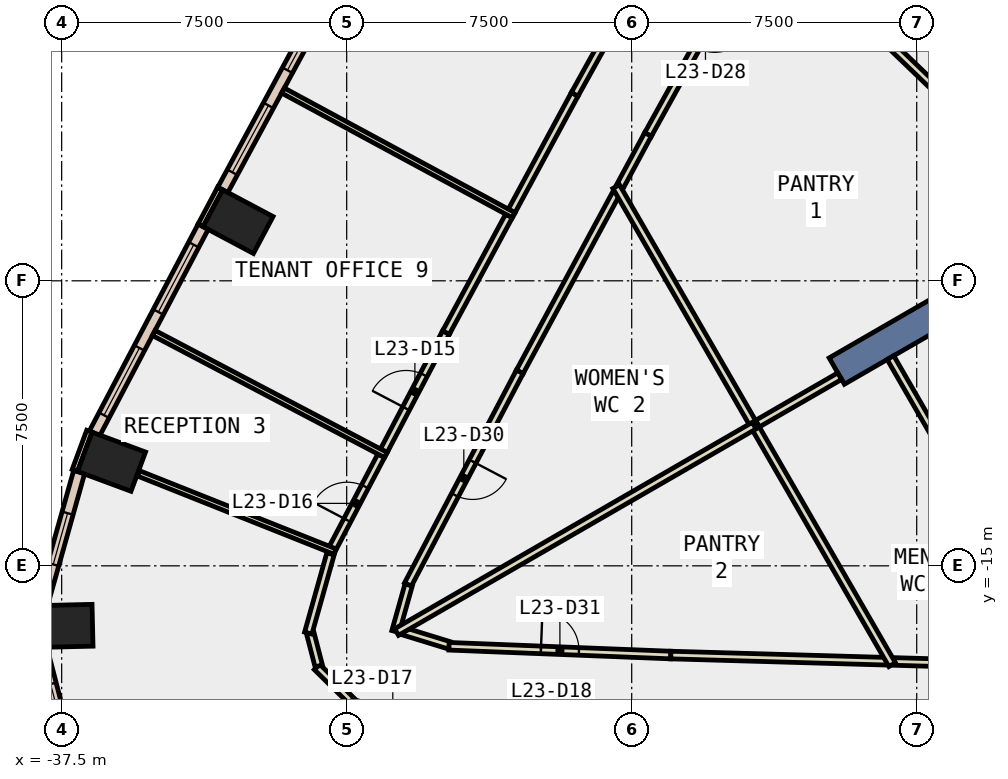
"""IFC4 building model, lengths in metres.
Left out: names, types, materials, properties, quantities, classifications, styles, units other than length and angle.
Written with IfcOpenShell. Run it as: python <this file> out.ifc"""

import sys

from ifc_helpers import new_model, si_unit, direction, frame, frame_2d, origin, origin_2d, place, context, subcontext, project, spatial, rectangle, extrude, element, fill, save


model = new_model("IFC4")
c1 = context("Model", 3, precision=1e-05, world=origin(), true_north=direction((0.0, 1.0)))
c2 = subcontext(c1, "Body", "Model", "MODEL_VIEW")
j1 = project(units=[si_unit("LENGTHUNIT", "METRE"), si_unit("PLANEANGLEUNIT", "RADIAN")], contexts=[c1])
p1 = place(None, origin())
s1 = spatial("IfcSite", under=j1, at=p1, CompositionType="ELEMENT")
p2 = place(p1, origin())
s2 = spatial("IfcBuilding", under=s1, at=p2, CompositionType="ELEMENT")
p3 = place(p2, frame((0.0, 0.0, 107.6)))
s3 = spatial("IfcBuildingStorey", under=s2, at=p3, CompositionType="ELEMENT", Elevation=107.6)
for number, where, z_axis, x_axis in (
    (1, (-32.858, -5.943, -0.4), (0.0, 0.0, 1.0), (0.469, 0.883, 0.0)),
    (2, (-36.188, -12.261, -0.4), (0.0, 0.0, 1.0), (0.347, 0.938, 0.0)),
    (3, (-37.438, -16.581, -0.4), (0.0, 0.0, 1.0), (-0.023, 1.0, 0.0)),
):
    element("IfcColumn", number, at=place(p3, frame(where, z_axis=z_axis, x_axis=x_axis)), inside=s3, PredefinedType="COLUMN", context=c2, shape_type="SweptSolid", body=[
        extrude(rectangle(XDim=1.1, YDim=1.5, at=origin_2d()), origin(), (0.0, 0.0, 1.0), 4.2),
    ])
p4 = place(p3, frame((-9.31, -5.375, -0.4), z_axis=(0.0, 0.0, 1.0), x_axis=(-0.866017533419, -0.500013631625, 0.0)))
e4 = element("IfcWall", 4, at=p4, inside=s3, PredefinedType="SHEAR", context=c2, shape_type="SweptSolid", body=[
    extrude(rectangle(XDim=9.0, YDim=0.8, at=frame_2d((4.5, 0.0))), origin(), (0.0, 0.0, 1.0), 4.2),
])
p5 = place(p3, frame((-33.329, -5.071, 0.0), z_axis=(0.0, 0.0, 1.0), x_axis=(-0.46919310775, -0.883095593716, 0.0)))
e5 = element("IfcWall", 5, at=p5, inside=s3, PredefinedType="STANDARD", context=c2, shape_type="SweptSolid", body=[
    extrude(rectangle(XDim=1.099, YDim=0.15, at=frame_2d((0.55, 0.0))), origin(), (0.0, 0.0, 1.0), 3.8),
])
p6 = place(p3, frame((-36.771, -11.458, 0.0), z_axis=(0.0, 0.0, 1.0), x_axis=(-0.347205967468, -0.937788897436, 0.0)))
e6 = element("IfcWall", 6, at=p6, inside=s3, PredefinedType="STANDARD", context=c2, shape_type="SweptSolid", body=[
    extrude(rectangle(XDim=1.1, YDim=0.15, at=frame_2d((0.55, 0.0))), origin(), (0.0, 0.0, 1.0), 3.8),
])
p7 = place(p3, frame((-30.357, 0.262, 0.0), z_axis=(0.0, 0.0, 1.0), x_axis=(-0.475573079782, -0.879676216449, 0.0)))
e7 = element("IfcWall", 7, at=p7, inside=s3, PredefinedType="STANDARD", context=c2, shape_type="SweptSolid", body=[
    extrude(rectangle(XDim=6.104, YDim=0.3, at=frame_2d((3.052, 0.0))), origin(), (0.0, 0.0, 1.0), 3.8),
])
p8 = place(p7, frame((0.526, 0.0, 0.9)))
e8 = element("IfcOpeningElement", 8, at=p8, cuts=e7, PredefinedType="OPENING", context=c2, shape_type="SweptSolid", body=[
    extrude(rectangle(XDim=2.0, YDim=2.6, at=frame_2d((1.0, 1.3))), frame((0.0, 0.16, 0.0), z_axis=(0.0, -1.0, 0.0), x_axis=(1.0, 0.0, 0.0)), (0.0, 0.0, 1.0), 0.32),
])
p9 = place(p7, frame((3.578, 0.0, 0.9)))
e9 = element("IfcOpeningElement", 9, at=p9, cuts=e7, PredefinedType="OPENING", context=c2, shape_type="SweptSolid", body=[
    extrude(rectangle(XDim=2.0, YDim=2.6, at=frame_2d((1.0, 1.3))), frame((0.0, 0.16, 0.0), z_axis=(0.0, -1.0, 0.0), x_axis=(1.0, 0.0, 0.0)), (0.0, 0.0, 1.0), 0.32),
])
p10 = place(p3, frame((-33.776, -6.077, 0.0), z_axis=(0.0, 0.0, 1.0), x_axis=(-0.465380908665, -0.88511050714, 0.0)))
e10 = element("IfcWall", 10, at=p10, inside=s3, PredefinedType="STANDARD", context=c2, shape_type="SweptSolid", body=[
    extrude(rectangle(XDim=6.139, YDim=0.3, at=frame_2d((3.07, 0.0))), origin(), (0.0, 0.0, 1.0), 3.8),
])
p11 = place(p10, frame((0.535, 0.0, 0.9)))
e11 = element("IfcOpeningElement", 11, at=p11, cuts=e10, PredefinedType="OPENING", context=c2, shape_type="SweptSolid", body=[
    extrude(rectangle(XDim=2.0, YDim=2.6, at=frame_2d((1.0, 1.3))), frame((0.0, 0.16, 0.0), z_axis=(0.0, -1.0, 0.0), x_axis=(1.0, 0.0, 0.0)), (0.0, 0.0, 1.0), 0.32),
])
p12 = place(p10, frame((3.604, 0.0, 0.9)))
e12 = element("IfcOpeningElement", 12, at=p12, cuts=e10, PredefinedType="OPENING", context=c2, shape_type="SweptSolid", body=[
    extrude(rectangle(XDim=2.0, YDim=2.6, at=frame_2d((1.0, 1.3))), frame((0.0, 0.16, 0.0), z_axis=(0.0, -1.0, 0.0), x_axis=(1.0, 0.0, 0.0)), (0.0, 0.0, 1.0), 0.32),
])
p13 = place(p3, frame((-37.04, -12.531, 0.0), z_axis=(0.0, 0.0, 1.0), x_axis=(-0.270054089595, -0.96284515302, 0.0)))
e13 = element("IfcWall", 13, at=p13, inside=s3, PredefinedType="STANDARD", context=c2, shape_type="SweptSolid", body=[
    extrude(rectangle(XDim=3.651, YDim=0.3, at=frame_2d((1.825, 0.0))), origin(), (0.0, 0.0, 1.0), 3.8),
])
p14 = place(p13, frame((1.125, 0.0, 0.9)))
e14 = element("IfcOpeningElement", 14, at=p14, cuts=e13, PredefinedType="OPENING", context=c2, shape_type="SweptSolid", body=[
    extrude(rectangle(XDim=1.4, YDim=2.6, at=frame_2d((0.7, 1.3))), frame((0.0, 0.16, 0.0), z_axis=(0.0, -1.0, 0.0), x_axis=(1.0, 0.0, 0.0)), (0.0, 0.0, 1.0), 0.32),
])
p15 = place(p3, frame((-38.042, -17.144, 0.0), z_axis=(0.0, 0.0, 1.0), x_axis=(0.251046938153, -0.967974914367, 0.0)))
e15 = element("IfcWall", 15, at=p15, inside=s3, PredefinedType="STANDARD", context=c2, shape_type="SweptSolid", body=[
    extrude(rectangle(XDim=3.398, YDim=0.3, at=frame_2d((1.699, 0.0))), origin(), (0.0, 0.0, 1.0), 3.8),
])
p16 = place(p15, frame((0.999, 0.0, 0.9)))
e16 = element("IfcOpeningElement", 16, at=p16, cuts=e15, PredefinedType="OPENING", context=c2, shape_type="SweptSolid", body=[
    extrude(rectangle(XDim=1.4, YDim=2.6, at=frame_2d((0.7, 1.3))), frame((0.0, 0.16, 0.0), z_axis=(0.0, -1.0, 0.0), x_axis=(1.0, 0.0, 0.0)), (0.0, 0.0, 1.0), 0.32),
])
p17 = place(p3, frame((-19.047, 1.799, 0.0), z_axis=(0.0, 0.0, 1.0), x_axis=(-0.485240396382, -0.87438078531, 0.0)))
e17 = element("IfcWall", 17, at=p17, inside=s3, PredefinedType="PARTITIONING", context=c2, shape_type="SweptSolid", body=[
    extrude(rectangle(XDim=6.232, YDim=0.2, at=frame_2d((3.116, 0.0))), origin(), (0.0, 0.0, 1.0), 3.8),
])
p18 = place(p17, frame((2.616, 0.0, 0.0)))
e18 = element("IfcOpeningElement", 18, at=p18, cuts=e17, PredefinedType="OPENING", context=c2, shape_type="SweptSolid", body=[
    extrude(rectangle(XDim=1.0, YDim=2.1, at=frame_2d((0.5, 1.05))), frame((0.0, 0.11, 0.0), z_axis=(0.0, -1.0, 0.0), x_axis=(1.0, 0.0, 0.0)), (0.0, 0.0, 1.0), 0.22),
])
p19 = place(p3, frame((-22.071, -3.65, 0.0), z_axis=(0.0, 0.0, 1.0), x_axis=(-0.475212034938, -0.879871309823, 0.0)))
e19 = element("IfcWall", 19, at=p19, inside=s3, PredefinedType="PARTITIONING", context=c2, shape_type="SweptSolid", body=[
    extrude(rectangle(XDim=1.557, YDim=0.2, at=frame_2d((0.779, 0.0))), origin(), (0.0, 0.0, 1.0), 3.8),
])
p20 = place(p3, frame((-15.596, -17.516, 0.0), z_axis=(0.0, 0.0, 1.0), x_axis=(0.99959813819, -0.028347171427, 0.0)))
e20 = element("IfcWall", 20, at=p20, inside=s3, PredefinedType="PARTITIONING", context=c2, shape_type="SweptSolid", body=[
    extrude(rectangle(XDim=1.016, YDim=0.2, at=frame_2d((0.508, 0.0))), origin(), (0.0, 0.0, 1.0), 3.8),
])
p21 = place(p3, frame((-22.906, -5.196, 0.0), z_axis=(0.0, 0.0, 1.0), x_axis=(-0.475448213767, -0.879743710421, 0.0)))
e21 = element("IfcWall", 21, at=p21, inside=s3, PredefinedType="PARTITIONING", context=c2, shape_type="SweptSolid", body=[
    extrude(rectangle(XDim=5.343, YDim=0.2, at=frame_2d((2.671, 0.0))), origin(), (0.0, 0.0, 1.0), 3.8),
])
p22 = place(p3, frame((-25.446, -9.896, 0.0), z_axis=(0.0, 0.0, 1.0), x_axis=(-0.465367816287, -0.885117390838, 0.0)))
e22 = element("IfcWall", 22, at=p22, inside=s3, PredefinedType="PARTITIONING", context=c2, shape_type="SweptSolid", body=[
    extrude(rectangle(XDim=6.326, YDim=0.2, at=frame_2d((3.163, 0.0))), origin(), (0.0, 0.0, 1.0), 3.8),
])
p23 = place(p22, frame((2.663, 0.0, 0.0)))
e23 = element("IfcOpeningElement", 23, at=p23, cuts=e22, PredefinedType="OPENING", context=c2, shape_type="SweptSolid", body=[
    extrude(rectangle(XDim=1.0, YDim=2.1, at=frame_2d((0.5, 1.05))), frame((0.0, 0.11, 0.0), z_axis=(0.0, -1.0, 0.0), x_axis=(1.0, 0.0, 0.0)), (0.0, 0.0, 1.0), 0.22),
])
p24 = place(p3, frame((-28.37, -15.503, 0.0), z_axis=(0.0, 0.0, 1.0), x_axis=(-0.270645732093, -0.962679015924, 0.0)))
e24 = element("IfcWall", 24, at=p24, inside=s3, PredefinedType="PARTITIONING", context=c2, shape_type="SweptSolid", body=[
    extrude(rectangle(XDim=1.275, YDim=0.2, at=frame_2d((0.637, 0.0))), origin(), (0.0, 0.0, 1.0), 3.8),
])
p25 = place(p3, frame((-28.503, -16.722, 0.0), z_axis=(0.0, 0.0, 1.0), x_axis=(0.95579582576, -0.294031187904, 0.0)))
e25 = element("IfcWall", 25, at=p25, inside=s3, PredefinedType="PARTITIONING", context=c2, shape_type="SweptSolid", body=[
    extrude(rectangle(XDim=1.255, YDim=0.2, at=frame_2d((0.628, 0.0))), origin(), (0.0, 0.0, 1.0), 3.8),
])
p26 = place(p3, frame((-27.307, -17.116, 0.0), z_axis=(0.0, 0.0, 1.0), x_axis=(0.999217829656, -0.039544012168, 0.0)))
e26 = element("IfcWall", 26, at=p26, inside=s3, PredefinedType="PARTITIONING", context=c2, shape_type="SweptSolid", body=[
    extrude(rectangle(XDim=5.841, YDim=0.2, at=frame_2d((2.92, 0.0))), origin(), (0.0, 0.0, 1.0), 3.8),
])
p27 = place(p26, frame((2.42, 0.0, 0.0)))
e27 = element("IfcOpeningElement", 27, at=p27, cuts=e26, PredefinedType="OPENING", context=c2, shape_type="SweptSolid", body=[
    extrude(rectangle(XDim=1.0, YDim=2.1, at=frame_2d((0.5, 1.05))), frame((0.0, 0.11, 0.0), z_axis=(0.0, -1.0, 0.0), x_axis=(1.0, 0.0, 0.0)), (0.0, 0.0, 1.0), 0.22),
])
p28 = place(p3, frame((-21.471, -17.347, 0.0), z_axis=(0.0, 0.0, 1.0), x_axis=(0.999587337564, -0.028725504044, 0.0)))
e28 = element("IfcWall", 28, at=p28, inside=s3, PredefinedType="PARTITIONING", context=c2, shape_type="SweptSolid", body=[
    extrude(rectangle(XDim=5.677, YDim=0.2, at=frame_2d((2.839, 0.0))), origin(), (0.0, 0.0, 1.0), 3.8),
])
p29 = place(p3, frame((-25.658, -5.661, 0.0), z_axis=(0.0, 0.0, 1.0), x_axis=(0.47543942367, 0.87974846088, 0.0)))
e29 = element("IfcWall", 29, at=p29, inside=s3, PredefinedType="PARTITIONING", context=c2, shape_type="SweptSolid", body=[
    extrude(rectangle(XDim=3.487, YDim=0.2, at=frame_2d((1.744, 0.0))), origin(), (0.0, 0.0, 1.0), 3.8),
])
p30 = place(p3, frame((-24.0, -2.593, 0.0), z_axis=(0.0, 0.0, 1.0), x_axis=(0.485148833338, 0.874431592242, 0.0)))
e30 = element("IfcWall", 30, at=p30, inside=s3, PredefinedType="PARTITIONING", context=c2, shape_type="SweptSolid", body=[
    extrude(rectangle(XDim=7.049, YDim=0.2, at=frame_2d((3.525, 0.0))), origin(), (0.0, 0.0, 1.0), 3.8),
])
p31 = place(p30, frame((3.099, 0.0, 0.0)))
e31 = element("IfcOpeningElement", 31, at=p31, cuts=e30, PredefinedType="OPENING", context=c2, shape_type="SweptSolid", body=[
    extrude(rectangle(XDim=1.0, YDim=2.1, at=frame_2d((0.5, 1.05))), frame((0.0, 0.11, 0.0), z_axis=(0.0, -1.0, 0.0), x_axis=(1.0, 0.0, 0.0)), (0.0, 0.0, 1.0), 0.22),
])
p32 = place(p3, frame((-29.023, -11.972, 0.0), z_axis=(0.0, 0.0, 1.0), x_axis=(0.465457263931, 0.885070356217, 0.0)))
e32 = element("IfcWall", 32, at=p32, inside=s3, PredefinedType="PARTITIONING", context=c2, shape_type="SweptSolid", body=[
    extrude(rectangle(XDim=3.515, YDim=0.2, at=frame_2d((1.757, 0.0))), origin(), (0.0, 0.0, 1.0), 3.8),
])
p33 = place(p32, frame((1.257, 0.0, 0.0)))
e33 = element("IfcOpeningElement", 33, at=p33, cuts=e32, PredefinedType="OPENING", context=c2, shape_type="SweptSolid", body=[
    extrude(rectangle(XDim=1.0, YDim=2.1, at=frame_2d((0.5, 1.05))), frame((0.0, 0.11, 0.0), z_axis=(0.0, -1.0, 0.0), x_axis=(1.0, 0.0, 0.0)), (0.0, 0.0, 1.0), 0.22),
])
p34 = place(p3, frame((-27.387, -8.861, 0.0), z_axis=(0.0, 0.0, 1.0), x_axis=(0.475193364801, 0.879881393171, 0.0)))
e34 = element("IfcWall", 34, at=p34, inside=s3, PredefinedType="PARTITIONING", context=c2, shape_type="SweptSolid", body=[
    extrude(rectangle(XDim=3.487, YDim=0.2, at=frame_2d((1.744, 0.0))), origin(), (0.0, 0.0, 1.0), 3.8),
])
p35 = place(p3, frame((-30.41, -14.61, 0.0), z_axis=(0.0, 0.0, 1.0), x_axis=(0.46516343569, 0.885224817827, 0.0)))
e35 = element("IfcWall", 35, at=p35, inside=s3, PredefinedType="PARTITIONING", context=c2, shape_type="SweptSolid", body=[
    extrude(rectangle(XDim=2.831, YDim=0.2, at=frame_2d((1.416, 0.0))), origin(), (0.0, 0.0, 1.0), 3.8),
])
p36 = place(p35, frame((0.916, 0.0, 0.0)))
e36 = element("IfcOpeningElement", 36, at=p36, cuts=e35, PredefinedType="OPENING", context=c2, shape_type="SweptSolid", body=[
    extrude(rectangle(XDim=1.0, YDim=2.1, at=frame_2d((0.5, 1.05))), frame((0.0, 0.11, 0.0), z_axis=(0.0, -1.0, 0.0), x_axis=(1.0, 0.0, 0.0)), (0.0, 0.0, 1.0), 0.22),
])
p37 = place(p3, frame((-27.676, -19.278, 0.0), z_axis=(0.0, 0.0, 1.0), x_axis=(-0.95581080774, 0.293982482143, 0.0)))
e37 = element("IfcWall", 37, at=p37, inside=s3, PredefinedType="PARTITIONING", context=c2, shape_type="SweptSolid", body=[
    extrude(rectangle(XDim=2.324, YDim=0.2, at=frame_2d((1.162, 0.0))), origin(), (0.0, 0.0, 1.0), 3.8),
])
p38 = place(p37, frame((0.662, 0.0, 0.0)))
e38 = element("IfcOpeningElement", 38, at=p38, cuts=e37, PredefinedType="OPENING", context=c2, shape_type="SweptSolid", body=[
    extrude(rectangle(XDim=1.0, YDim=2.1, at=frame_2d((0.5, 1.05))), frame((0.0, 0.11, 0.0), z_axis=(0.0, -1.0, 0.0), x_axis=(1.0, 0.0, 0.0)), (0.0, 0.0, 1.0), 0.22),
])
p39 = place(p3, frame((-29.873, -18.554, 0.0), z_axis=(0.0, 0.0, 1.0), x_axis=(-0.712546188185, 0.701625206006, 0.0)))
e39 = element("IfcWall", 39, at=p39, inside=s3, PredefinedType="PARTITIONING", context=c2, shape_type="SweptSolid", body=[
    extrude(rectangle(XDim=1.274, YDim=0.2, at=frame_2d((0.637, 0.0))), origin(), (0.0, 0.0, 1.0), 3.8),
])
p40 = place(p3, frame((-30.735, -17.634, 0.0), z_axis=(0.0, 0.0, 1.0), x_axis=(-0.251095196118, 0.967962397248, 0.0)))
e40 = element("IfcWall", 40, at=p40, inside=s3, PredefinedType="PARTITIONING", context=c2, shape_type="SweptSolid", body=[
    extrude(rectangle(XDim=0.892, YDim=0.2, at=frame_2d((0.446, 0.0))), origin(), (0.0, 0.0, 1.0), 3.8),
])
p41 = place(p3, frame((-31.011, -16.77, 0.0), z_axis=(0.0, 0.0, 1.0), x_axis=(0.270131711391, 0.962823378664, 0.0)))
e41 = element("IfcWall", 41, at=p41, inside=s3, PredefinedType="PARTITIONING", context=c2, shape_type="SweptSolid", body=[
    extrude(rectangle(XDim=2.166, YDim=0.2, at=frame_2d((1.083, 0.0))), origin(), (0.0, 0.0, 1.0), 3.8),
])
p42 = place(p3, frame((-13.847, -12.716, 0.0), z_axis=(0.0, 0.0, 1.0), x_axis=(-0.499861859587, 0.866105144501, 0.0)))
e42 = element("IfcWall", 42, at=p42, inside=s3, PredefinedType="PARTITIONING", context=c2, shape_type="SweptSolid", body=[
    extrude(rectangle(XDim=3.689, YDim=0.2, at=frame_2d((1.844, 0.0))), origin(), (0.0, 0.0, 1.0), 3.8),
])
p43 = place(p3, frame((-17.027, -10.009, 0.0), z_axis=(0.0, 0.0, 1.0), x_axis=(-0.865950948929, -0.500128937424, 0.0)))
e43 = element("IfcWall", 43, at=p43, inside=s3, PredefinedType="PARTITIONING", context=c2, shape_type="SweptSolid", body=[
    extrude(rectangle(XDim=2.599, YDim=0.2, at=frame_2d((1.3, 0.0))), origin(), (0.0, 0.0, 1.0), 3.8),
])
p44 = place(p3, frame((-19.278, -11.309, 0.0), z_axis=(0.0, 0.0, 1.0), x_axis=(-0.500044545065, 0.865999684151, 0.0)))
e44 = element("IfcWall", 44, at=p44, inside=s3, PredefinedType="PARTITIONING", context=c2, shape_type="SweptSolid", body=[
    extrude(rectangle(XDim=7.261, YDim=0.2, at=frame_2d((3.63, 0.0))), origin(), (0.0, 0.0, 1.0), 3.8),
])
p45 = place(p3, frame((-15.646, -17.6, 0.0), z_axis=(0.0, 0.0, 1.0), x_axis=(-0.499953299825, 0.866052364464, 0.0)))
e45 = element("IfcWall", 45, at=p45, inside=s3, PredefinedType="PARTITIONING", context=c2, shape_type="SweptSolid", body=[
    extrude(rectangle(XDim=7.263, YDim=0.2, at=frame_2d((3.631, 0.0))), origin(), (0.0, 0.0, 1.0), 3.8),
])
p46 = place(p3, frame((-19.277, -11.311, 0.0), z_axis=(0.0, 0.0, 1.0), x_axis=(-0.866078939042, -0.499907262747, 0.0)))
e46 = element("IfcWall", 46, at=p46, inside=s3, PredefinedType="PARTITIONING", context=c2, shape_type="SweptSolid", body=[
    extrude(rectangle(XDim=10.864, YDim=0.2, at=frame_2d((5.432, 0.0))), origin(), (0.0, 0.0, 1.0), 3.8),
])
p47 = place(p3, frame((-25.606, -5.775, 0.0), z_axis=(0.0, 0.0, 1.0), x_axis=(-0.87974530848, 0.475445256793, 0.0)))
e47 = element("IfcWall", 47, at=p47, inside=s3, PredefinedType="PARTITIONING", context=c2, shape_type="SweptSolid", body=[
    extrude(rectangle(XDim=6.901, YDim=0.15, at=frame_2d((3.45, 0.0))), origin(), (0.0, 0.0, 1.0), 3.8),
])
p48 = place(p3, frame((-28.969, -12.084, 0.0), z_axis=(0.0, 0.0, 1.0), x_axis=(-0.885142220222, 0.465320588391, 0.0)))
e48 = element("IfcWall", 48, at=p48, inside=s3, PredefinedType="PARTITIONING", context=c2, shape_type="SweptSolid", body=[
    extrude(rectangle(XDim=6.9, YDim=0.15, at=frame_2d((3.45, 0.0))), origin(), (0.0, 0.0, 1.0), 3.8),
])
p49 = place(p3, frame((-30.306, -14.625, 0.0), z_axis=(0.0, 0.0, 1.0), x_axis=(-0.929128339298, 0.369757392235, 0.0)))
e49 = element("IfcWall", 49, at=p49, inside=s3, PredefinedType="PARTITIONING", context=c2, shape_type="SweptSolid", body=[
    extrude(rectangle(XDim=5.569, YDim=0.15, at=frame_2d((2.784, 0.0))), origin(), (0.0, 0.0, 1.0), 3.8),
])
p50 = place(p3, frame((-10.96, -5.834, 0.0), z_axis=(0.0, 0.0, 1.0), x_axis=(-0.721236335428, 0.692689070549, 0.0)))
e50 = element("IfcWall", 50, at=p50, inside=s3, PredefinedType="PARTITIONING", context=c2, shape_type="SweptSolid", body=[
    extrude(rectangle(XDim=11.246, YDim=0.2, at=frame_2d((5.623, 0.0))), origin(), (0.0, 0.0, 1.0), 3.8),
])
p51 = place(p8, origin())
e51 = element("IfcWindow", 51, at=p51, inside=s3, PartitioningType="SINGLE_PANEL", PredefinedType="WINDOW", context=c2, shape_type="SweptSolid", body=[
    extrude(rectangle(XDim=2.0, YDim=2.6, at=frame_2d((1.0, 1.3))), frame((0.0, 0.03, 0.0), z_axis=(0.0, -1.0, 0.0), x_axis=(1.0, 0.0, 0.0)), (0.0, 0.0, 1.0), 0.06),
])
fill(e8, e51)
p52 = place(p9, origin())
e52 = element("IfcWindow", 52, at=p52, inside=s3, PartitioningType="SINGLE_PANEL", PredefinedType="WINDOW", context=c2, shape_type="SweptSolid", body=[
    extrude(rectangle(XDim=2.0, YDim=2.6, at=frame_2d((1.0, 1.3))), frame((0.0, 0.03, 0.0), z_axis=(0.0, -1.0, 0.0), x_axis=(1.0, 0.0, 0.0)), (0.0, 0.0, 1.0), 0.06),
])
fill(e9, e52)
p53 = place(p11, origin())
e53 = element("IfcWindow", 53, at=p53, inside=s3, PartitioningType="SINGLE_PANEL", PredefinedType="WINDOW", context=c2, shape_type="SweptSolid", body=[
    extrude(rectangle(XDim=2.0, YDim=2.6, at=frame_2d((1.0, 1.3))), frame((0.0, 0.03, 0.0), z_axis=(0.0, -1.0, 0.0), x_axis=(1.0, 0.0, 0.0)), (0.0, 0.0, 1.0), 0.06),
])
fill(e11, e53)
p54 = place(p12, origin())
e54 = element("IfcWindow", 54, at=p54, inside=s3, PartitioningType="SINGLE_PANEL", PredefinedType="WINDOW", context=c2, shape_type="SweptSolid", body=[
    extrude(rectangle(XDim=2.0, YDim=2.6, at=frame_2d((1.0, 1.3))), frame((0.0, 0.03, 0.0), z_axis=(0.0, -1.0, 0.0), x_axis=(1.0, 0.0, 0.0)), (0.0, 0.0, 1.0), 0.06),
])
fill(e12, e54)
p55 = place(p14, origin())
e55 = element("IfcWindow", 55, at=p55, inside=s3, PartitioningType="SINGLE_PANEL", PredefinedType="WINDOW", context=c2, shape_type="SweptSolid", body=[
    extrude(rectangle(XDim=1.4, YDim=2.6, at=frame_2d((0.7, 1.3))), frame((0.0, 0.03, 0.0), z_axis=(0.0, -1.0, 0.0), x_axis=(1.0, 0.0, 0.0)), (0.0, 0.0, 1.0), 0.06),
])
fill(e14, e55)
p56 = place(p16, origin())
e56 = element("IfcWindow", 56, at=p56, inside=s3, PartitioningType="SINGLE_PANEL", PredefinedType="WINDOW", context=c2, shape_type="SweptSolid", body=[
    extrude(rectangle(XDim=1.4, YDim=2.6, at=frame_2d((0.7, 1.3))), frame((0.0, 0.03, 0.0), z_axis=(0.0, -1.0, 0.0), x_axis=(1.0, 0.0, 0.0)), (0.0, 0.0, 1.0), 0.06),
])
fill(e16, e56)
p57 = place(p33, origin())
e57 = element("IfcDoor", 57, at=p57, inside=s3, OperationType="SINGLE_SWING_RIGHT", PredefinedType="DOOR", context=c2, shape_type="SweptSolid", body=[
    extrude(rectangle(XDim=1.0, YDim=2.1, at=frame_2d((0.5, 1.05))), frame((0.0, 0.025, 0.0), z_axis=(0.0, -1.0, 0.0), x_axis=(1.0, 0.0, 0.0)), (0.0, 0.0, 1.0), 0.05),
])
fill(e33, e57)
p58 = place(p36, origin())
e58 = element("IfcDoor", 58, at=p58, inside=s3, OperationType="SINGLE_SWING_LEFT", PredefinedType="DOOR", context=c2, shape_type="SweptSolid", body=[
    extrude(rectangle(XDim=1.0, YDim=2.1, at=frame_2d((0.5, 1.05))), frame((0.0, 0.025, 0.0), z_axis=(0.0, -1.0, 0.0), x_axis=(1.0, 0.0, 0.0)), (0.0, 0.0, 1.0), 0.05),
])
fill(e36, e58)
p59 = place(p23, origin())
e59 = element("IfcDoor", 59, at=p59, inside=s3, OperationType="SINGLE_SWING_LEFT", PredefinedType="DOOR", context=c2, shape_type="SweptSolid", body=[
    extrude(rectangle(XDim=1.0, YDim=2.1, at=frame_2d((0.5, 1.05))), frame((0.0, 0.025, 0.0), z_axis=(0.0, -1.0, 0.0), x_axis=(1.0, 0.0, 0.0)), (0.0, 0.0, 1.0), 0.05),
])
fill(e23, e59)
p60 = place(p27, origin())
e60 = element("IfcDoor", 60, at=p60, inside=s3, OperationType="SINGLE_SWING_LEFT", PredefinedType="DOOR", context=c2, shape_type="SweptSolid", body=[
    extrude(rectangle(XDim=1.0, YDim=2.1, at=frame_2d((0.5, 1.05))), frame((0.0, 0.025, 0.0), z_axis=(0.0, -1.0, 0.0), x_axis=(1.0, 0.0, 0.0)), (0.0, 0.0, 1.0), 0.05),
])
fill(e27, e60)
save(model, sys.argv[1])
